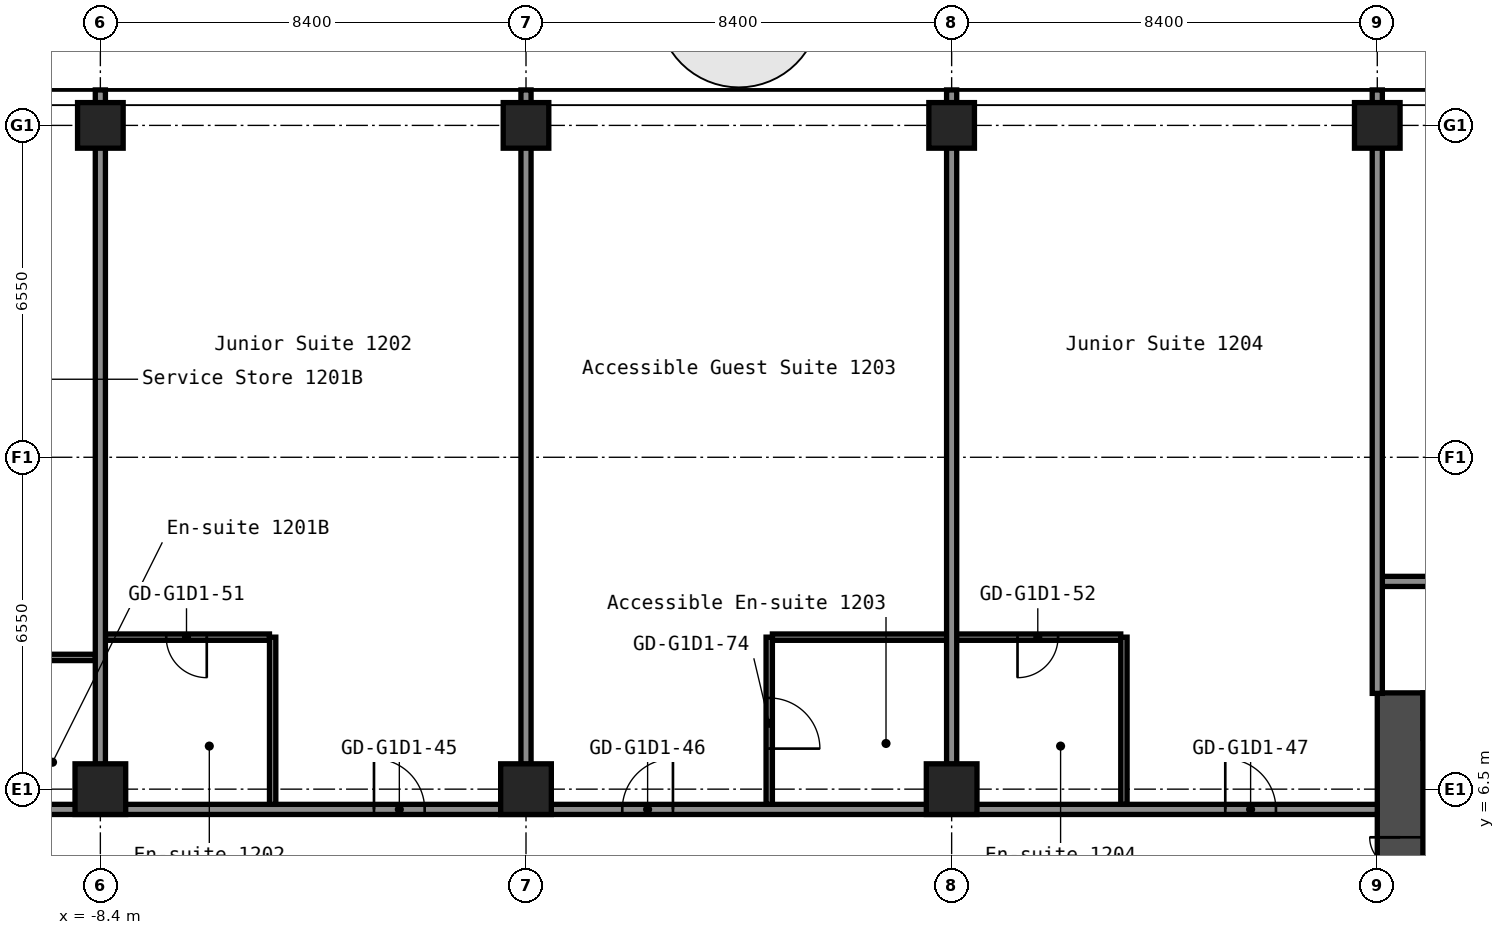
"""IFC4 building model, lengths in metres.
Left out: names, types, materials, properties, quantities, classifications, styles, units other than length and angle.
Written with IfcOpenShell. Run it as: python <this file> out.ifc"""

import sys

from ifc_helpers import new_model, si_unit, direction, frame, frame_2d, origin, origin_2d, place, context, subcontext, project, spatial, rectangle, hollow_rectangle, extrude, element, fill, save


model = new_model("IFC4")
c1 = context("Model", 3, precision=1e-05, world=origin(), true_north=direction((0.0, 1.0)))
c2 = subcontext(c1, "Body", "Model", "MODEL_VIEW")
j1 = project(units=[si_unit("LENGTHUNIT", "METRE"), si_unit("PLANEANGLEUNIT", "RADIAN")], contexts=[c1])
p1 = place(None, origin())
s1 = spatial("IfcSite", under=j1, at=p1, CompositionType="ELEMENT")
p2 = place(p1, origin())
s2 = spatial("IfcBuilding", under=s1, at=p2, CompositionType="ELEMENT")
p3 = place(p2, frame((0.0, 0.0, 45.4)))
s3 = spatial("IfcBuildingStorey", under=s2, at=p3, CompositionType="ELEMENT", Elevation=45.4)
p4 = place(p3, frame((-8.4, 6.5, 0.0), z_axis=(0.0, 0.0, 1.0), x_axis=(1.0, 0.0, 0.0)))
e1 = element("IfcColumn", 1, at=p4, inside=s3, PredefinedType="COLUMN", context=c2, shape_type="SweptSolid", body=[
    extrude(hollow_rectangle(XDim=1.0, YDim=1.0, WallThickness=0.04, at=origin_2d()), origin(), (0.0, 0.0, 1.0), 2.8),
])
p5 = place(p3, frame((-8.4, 19.6, 0.0), z_axis=(0.0, 0.0, 1.0), x_axis=(1.0, 0.0, 0.0)))
e2 = element("IfcColumn", 2, at=p5, inside=s3, PredefinedType="COLUMN", context=c2, shape_type="SweptSolid", body=[
    extrude(hollow_rectangle(XDim=0.9, YDim=0.9, WallThickness=0.036, at=origin_2d()), origin(), (0.0, 0.0, 1.0), 2.8),
])
p6 = place(p3, frame((0.0, 6.5, 0.0), z_axis=(0.0, 0.0, 1.0), x_axis=(1.0, 0.0, 0.0)))
e3 = element("IfcColumn", 3, at=p6, inside=s3, PredefinedType="COLUMN", context=c2, shape_type="SweptSolid", body=[
    extrude(hollow_rectangle(XDim=1.0, YDim=1.0, WallThickness=0.04, at=origin_2d()), origin(), (0.0, 0.0, 1.0), 2.8),
])
p7 = place(p3, frame((0.0, 19.6, 0.0), z_axis=(0.0, 0.0, 1.0), x_axis=(1.0, 0.0, 0.0)))
e4 = element("IfcColumn", 4, at=p7, inside=s3, PredefinedType="COLUMN", context=c2, shape_type="SweptSolid", body=[
    extrude(hollow_rectangle(XDim=0.9, YDim=0.9, WallThickness=0.036, at=origin_2d()), origin(), (0.0, 0.0, 1.0), 2.8),
])
p8 = place(p3, frame((8.4, 6.5, 0.0), z_axis=(0.0, 0.0, 1.0), x_axis=(1.0, 0.0, 0.0)))
e5 = element("IfcColumn", 5, at=p8, inside=s3, PredefinedType="COLUMN", context=c2, shape_type="SweptSolid", body=[
    extrude(hollow_rectangle(XDim=1.0, YDim=1.0, WallThickness=0.04, at=origin_2d()), origin(), (0.0, 0.0, 1.0), 2.8),
])
for number, where, z_axis, x_axis in (
    (6, (8.4, 19.6, 0.0), (0.0, 0.0, 1.0), (1.0, 0.0, 0.0)),
    (7, (16.8, 19.6, 0.0), (0.0, 0.0, 1.0), (1.0, 0.0, 0.0)),
):
    element("IfcColumn", number, at=place(p3, frame(where, z_axis=z_axis, x_axis=x_axis)), inside=s3, PredefinedType="COLUMN", context=c2, shape_type="SweptSolid", body=[
        extrude(hollow_rectangle(XDim=0.9, YDim=0.9, WallThickness=0.036, at=origin_2d()), origin(), (0.0, 0.0, 1.0), 2.8),
    ])
p9 = place(p3, frame((17.25, -8.4, 0.0), z_axis=(0.0, 0.0, 1.0), x_axis=(0.0, 1.0, 0.0)))
e8 = element("IfcWall", 8, at=p9, inside=s3, PredefinedType="SHEAR", context=c2, shape_type="SweptSolid", body=[
    extrude(rectangle(XDim=16.8, YDim=0.9, at=frame_2d((8.4, 0.0))), origin(), (0.0, 0.0, 1.0), 2.8),
])
p10 = place(p9, frame((12.75, 0.0, 0.0)))
e9 = element("IfcOpeningElement", 9, at=p10, cuts=e8, PredefinedType="OPENING", context=c2, shape_type="SweptSolid", body=[
    extrude(rectangle(XDim=1.2, YDim=2.1, at=frame_2d((0.6, 1.05))), frame((0.0, 0.46, 0.0), z_axis=(0.0, -1.0, 0.0), x_axis=(1.0, 0.0, 0.0)), (0.0, 0.0, 1.0), 0.92),
])
p11 = place(p9, frame((2.85, 0.0, 0.0)))
e10 = element("IfcOpeningElement", 10, at=p11, cuts=e8, PredefinedType="OPENING", context=c2, shape_type="SweptSolid", body=[
    extrude(rectangle(XDim=1.2, YDim=2.1, at=frame_2d((0.6, 1.05))), frame((0.0, 0.46, 0.0), z_axis=(0.0, -1.0, 0.0), x_axis=(1.0, 0.0, 0.0)), (0.0, 0.0, 1.0), 0.92),
])
p12 = place(p3, frame((17.7, 7.95, 0.0), z_axis=(0.0, 0.0, 1.0), x_axis=(1.0, 0.0, 0.0)))
e11 = element("IfcWall", 11, at=p12, inside=s3, PredefinedType="SHEAR", context=c2, shape_type="SweptSolid", body=[
    extrude(rectangle(XDim=15.0, YDim=0.9, at=frame_2d((7.5, 0.0))), origin(), (0.0, 0.0, 1.0), 2.8),
])
p13 = place(p12, frame((10.4, 0.0, 0.0)))
e12 = element("IfcOpeningElement", 12, at=p13, cuts=e11, PredefinedType="OPENING", context=c2, shape_type="SweptSolid", body=[
    extrude(rectangle(XDim=1.2, YDim=2.1, at=frame_2d((0.6, 1.05))), frame((0.0, 0.46, 0.0), z_axis=(0.0, -1.0, 0.0), x_axis=(1.0, 0.0, 0.0)), (0.0, 0.0, 1.0), 0.92),
])
p14 = place(p12, frame((13.35, 0.0, 0.0)))
e13 = element("IfcOpeningElement", 13, at=p14, cuts=e11, PredefinedType="OPENING", context=c2, shape_type="SweptSolid", body=[
    extrude(rectangle(XDim=0.9, YDim=2.1, at=frame_2d((0.45, 1.05))), frame((0.0, 0.46, 0.0), z_axis=(0.0, -1.0, 0.0), x_axis=(1.0, 0.0, 0.0)), (0.0, 0.0, 1.0), 0.92),
])
p15 = place(p3, frame((-16.8, 6.1, 0.0), z_axis=(0.0, 0.0, 1.0), x_axis=(1.0, 0.0, 0.0)))
e14 = element("IfcWall", 14, at=p15, inside=s3, PredefinedType="PARTITIONING", context=c2, shape_type="SweptSolid", body=[
    extrude(rectangle(XDim=33.6, YDim=0.2, at=frame_2d((16.8, 0.0))), origin(), (0.0, 0.0, 1.0), 2.8),
])
p16 = place(p15, frame((2.85, 0.0, 0.0)))
e15 = element("IfcOpeningElement", 15, at=p16, cuts=e14, PredefinedType="OPENING", context=c2, shape_type="SweptSolid", body=[
    extrude(rectangle(XDim=1.0, YDim=2.1, at=frame_2d((0.5, 1.05))), frame((0.0, 0.11, 0.0), z_axis=(0.0, -1.0, 0.0), x_axis=(1.0, 0.0, 0.0)), (0.0, 0.0, 1.0), 0.22),
])
p17 = place(p15, frame((4.55, 0.0, 0.0)))
e16 = element("IfcOpeningElement", 16, at=p17, cuts=e14, PredefinedType="OPENING", context=c2, shape_type="SweptSolid", body=[
    extrude(rectangle(XDim=1.0, YDim=2.1, at=frame_2d((0.5, 1.05))), frame((0.0, 0.11, 0.0), z_axis=(0.0, -1.0, 0.0), x_axis=(1.0, 0.0, 0.0)), (0.0, 0.0, 1.0), 0.22),
])
p18 = place(p15, frame((13.8, 0.0, 0.0)))
e17 = element("IfcOpeningElement", 17, at=p18, cuts=e14, PredefinedType="OPENING", context=c2, shape_type="SweptSolid", body=[
    extrude(rectangle(XDim=1.0, YDim=2.1, at=frame_2d((0.5, 1.05))), frame((0.0, 0.11, 0.0), z_axis=(0.0, -1.0, 0.0), x_axis=(1.0, 0.0, 0.0)), (0.0, 0.0, 1.0), 0.22),
])
p19 = place(p15, frame((18.7, 0.0, 0.0)))
e18 = element("IfcOpeningElement", 18, at=p19, cuts=e14, PredefinedType="OPENING", context=c2, shape_type="SweptSolid", body=[
    extrude(rectangle(XDim=1.0, YDim=2.1, at=frame_2d((0.5, 1.05))), frame((0.0, 0.11, 0.0), z_axis=(0.0, -1.0, 0.0), x_axis=(1.0, 0.0, 0.0)), (0.0, 0.0, 1.0), 0.22),
])
p20 = place(p15, frame((30.6, 0.0, 0.0)))
e19 = element("IfcOpeningElement", 19, at=p20, cuts=e14, PredefinedType="OPENING", context=c2, shape_type="SweptSolid", body=[
    extrude(rectangle(XDim=1.0, YDim=2.1, at=frame_2d((0.5, 1.05))), frame((0.0, 0.11, 0.0), z_axis=(0.0, -1.0, 0.0), x_axis=(1.0, 0.0, 0.0)), (0.0, 0.0, 1.0), 0.22),
])
p21 = place(p3, frame((-10.837, 9.1, 0.0), z_axis=(0.0, 0.0, 1.0), x_axis=(1.0, 0.0, 0.0)))
e20 = element("IfcWall", 20, at=p21, inside=s3, PredefinedType="PARTITIONING", context=c2, shape_type="SweptSolid", body=[
    extrude(rectangle(XDim=2.337, YDim=0.125, at=frame_2d((1.169, 0.0))), origin(), (0.0, 0.0, 1.0), 2.8),
])
p22 = place(p3, frame((-8.3, 9.5, 0.0), z_axis=(0.0, 0.0, 1.0), x_axis=(1.0, 0.0, 0.0)))
e21 = element("IfcWall", 21, at=p22, inside=s3, PredefinedType="PARTITIONING", context=c2, shape_type="SweptSolid", body=[
    extrude(rectangle(XDim=3.238, YDim=0.125, at=frame_2d((1.619, 0.0))), origin(), (0.0, 0.0, 1.0), 2.8),
])
p23 = place(p22, frame((1.2, 0.0, 0.0)))
e22 = element("IfcOpeningElement", 22, at=p23, cuts=e21, PredefinedType="OPENING", context=c2, shape_type="SweptSolid", body=[
    extrude(rectangle(XDim=0.8, YDim=2.1, at=frame_2d((0.4, 1.05))), frame((0.0, 0.073, 0.0), z_axis=(0.0, -1.0, 0.0), x_axis=(1.0, 0.0, 0.0)), (0.0, 0.0, 1.0), 0.145),
])
p24 = place(p3, frame((4.863, 9.5, 0.0), z_axis=(0.0, 0.0, 1.0), x_axis=(1.0, 0.0, 0.0)))
e23 = element("IfcWall", 23, at=p24, inside=s3, PredefinedType="PARTITIONING", context=c2, shape_type="SweptSolid", body=[
    extrude(rectangle(XDim=6.875, YDim=0.125, at=frame_2d((3.438, 0.0))), origin(), (0.0, 0.0, 1.0), 2.8),
])
p25 = place(p24, frame((4.837, 0.0, 0.0)))
e24 = element("IfcOpeningElement", 24, at=p25, cuts=e23, PredefinedType="OPENING", context=c2, shape_type="SweptSolid", body=[
    extrude(rectangle(XDim=0.8, YDim=2.1, at=frame_2d((0.4, 1.05))), frame((0.0, 0.073, 0.0), z_axis=(0.0, -1.0, 0.0), x_axis=(1.0, 0.0, 0.0)), (0.0, 0.0, 1.0), 0.145),
])
p26 = place(p3, frame((16.8, 10.6, 0.0), z_axis=(0.0, 0.0, 1.0), x_axis=(1.0, 0.0, 0.0)))
e25 = element("IfcWall", 25, at=p26, inside=s3, PredefinedType="PARTITIONING", context=c2, shape_type="SweptSolid", body=[
    extrude(rectangle(XDim=34.3, YDim=0.2, at=frame_2d((17.15, 0.0))), origin(), (0.0, 0.0, 1.0), 2.8),
])
p27 = place(p26, frame((3.4, 0.0, 0.0)))
e26 = element("IfcOpeningElement", 26, at=p27, cuts=e25, PredefinedType="OPENING", context=c2, shape_type="SweptSolid", body=[
    extrude(rectangle(XDim=1.6, YDim=2.1, at=frame_2d((0.8, 1.05))), frame((0.0, 0.11, 0.0), z_axis=(0.0, -1.0, 0.0), x_axis=(1.0, 0.0, 0.0)), (0.0, 0.0, 1.0), 0.22),
])
p28 = place(p26, frame((11.8, 0.0, 0.0)))
e27 = element("IfcOpeningElement", 27, at=p28, cuts=e25, PredefinedType="OPENING", context=c2, shape_type="SweptSolid", body=[
    extrude(rectangle(XDim=1.6, YDim=2.1, at=frame_2d((0.8, 1.05))), frame((0.0, 0.11, 0.0), z_axis=(0.0, -1.0, 0.0), x_axis=(1.0, 0.0, 0.0)), (0.0, 0.0, 1.0), 0.22),
])
p29 = place(p26, frame((20.2, 0.0, 0.0)))
e28 = element("IfcOpeningElement", 28, at=p29, cuts=e25, PredefinedType="OPENING", context=c2, shape_type="SweptSolid", body=[
    extrude(rectangle(XDim=1.6, YDim=2.1, at=frame_2d((0.8, 1.05))), frame((0.0, 0.11, 0.0), z_axis=(0.0, -1.0, 0.0), x_axis=(1.0, 0.0, 0.0)), (0.0, 0.0, 1.0), 0.22),
])
p30 = place(p26, frame((28.8, 0.0, 0.0)))
e29 = element("IfcOpeningElement", 29, at=p30, cuts=e25, PredefinedType="OPENING", context=c2, shape_type="SweptSolid", body=[
    extrude(rectangle(XDim=1.6, YDim=2.1, at=frame_2d((0.8, 1.05))), frame((0.0, 0.11, 0.0), z_axis=(0.0, -1.0, 0.0), x_axis=(1.0, 0.0, 0.0)), (0.0, 0.0, 1.0), 0.22),
])
p31 = place(p3, frame((-8.4, 6.99, 0.0), z_axis=(0.0, 0.0, 1.0), x_axis=(0.0, 1.0, 0.0)))
e30 = element("IfcWall", 30, at=p31, inside=s3, PredefinedType="PARTITIONING", context=c2, shape_type="SweptSolid", body=[
    extrude(rectangle(XDim=13.31, YDim=0.2, at=frame_2d((6.655, 0.0))), origin(), (0.0, 0.0, 1.0), 2.8),
])
p32 = place(p3, frame((-5.0, 6.2, 0.0), z_axis=(0.0, 0.0, 1.0), x_axis=(0.0, 1.0, 0.0)))
e31 = element("IfcWall", 31, at=p32, inside=s3, PredefinedType="PARTITIONING", context=c2, shape_type="SweptSolid", body=[
    extrude(rectangle(XDim=3.3, YDim=0.125, at=frame_2d((1.65, 0.0))), origin(), (0.0, 0.0, 1.0), 2.8),
])
p33 = place(p3, frame((0.0, 6.99, 0.0), z_axis=(0.0, 0.0, 1.0), x_axis=(0.0, 1.0, 0.0)))
e32 = element("IfcWall", 32, at=p33, inside=s3, PredefinedType="PARTITIONING", context=c2, shape_type="SweptSolid", body=[
    extrude(rectangle(XDim=13.31, YDim=0.2, at=frame_2d((6.655, 0.0))), origin(), (0.0, 0.0, 1.0), 2.8),
])
p34 = place(p3, frame((4.8, 6.2, 0.0), z_axis=(0.0, 0.0, 1.0), x_axis=(0.0, 1.0, 0.0)))
e33 = element("IfcWall", 33, at=p34, inside=s3, PredefinedType="PARTITIONING", context=c2, shape_type="SweptSolid", body=[
    extrude(rectangle(XDim=3.3, YDim=0.125, at=frame_2d((1.65, 0.0))), origin(), (0.0, 0.0, 1.0), 2.8),
])
p35 = place(p34, frame((1.1, 0.0, 0.0)))
e34 = element("IfcOpeningElement", 34, at=p35, cuts=e33, PredefinedType="OPENING", context=c2, shape_type="SweptSolid", body=[
    extrude(rectangle(XDim=1.0, YDim=2.1, at=frame_2d((0.5, 1.05))), frame((0.0, 0.073, 0.0), z_axis=(0.0, -1.0, 0.0), x_axis=(1.0, 0.0, 0.0)), (0.0, 0.0, 1.0), 0.145),
])
p36 = place(p3, frame((8.4, 6.99, 0.0), z_axis=(0.0, 0.0, 1.0), x_axis=(0.0, 1.0, 0.0)))
e35 = element("IfcWall", 35, at=p36, inside=s3, PredefinedType="PARTITIONING", context=c2, shape_type="SweptSolid", body=[
    extrude(rectangle(XDim=13.31, YDim=0.2, at=frame_2d((6.655, 0.0))), origin(), (0.0, 0.0, 1.0), 2.8),
])
p37 = place(p3, frame((11.8, 6.2, 0.0), z_axis=(0.0, 0.0, 1.0), x_axis=(0.0, 1.0, 0.0)))
e36 = element("IfcWall", 36, at=p37, inside=s3, PredefinedType="PARTITIONING", context=c2, shape_type="SweptSolid", body=[
    extrude(rectangle(XDim=3.3, YDim=0.125, at=frame_2d((1.65, 0.0))), origin(), (0.0, 0.0, 1.0), 2.8),
])
p38 = place(p3, frame((16.8, 8.39, 0.0), z_axis=(0.0, 0.0, 1.0), x_axis=(0.0, 1.0, 0.0)))
e37 = element("IfcWall", 37, at=p38, inside=s3, PredefinedType="PARTITIONING", context=c2, shape_type="SweptSolid", body=[
    extrude(rectangle(XDim=11.91, YDim=0.2, at=frame_2d((5.955, 0.0))), origin(), (0.0, 0.0, 1.0), 2.8),
])
p39 = place(p10, origin())
e38 = element("IfcDoor", 38, at=p39, inside=s3, OperationType="DOUBLE_DOOR_SINGLE_SWING", PredefinedType="DOOR", context=c2, shape_type="SweptSolid", body=[
    extrude(rectangle(XDim=1.2, YDim=2.1, at=frame_2d((0.6, 1.05))), frame((0.0, 0.025, 0.0), z_axis=(0.0, -1.0, 0.0), x_axis=(1.0, 0.0, 0.0)), (0.0, 0.0, 1.0), 0.05),
])
fill(e9, e38)
p40 = place(p18, origin())
e39 = element("IfcDoor", 39, at=p40, inside=s3, OperationType="SINGLE_SWING_RIGHT", PredefinedType="DOOR", context=c2, shape_type="SweptSolid", body=[
    extrude(rectangle(XDim=1.0, YDim=2.1, at=frame_2d((0.5, 1.05))), frame((0.0, 0.025, 0.0), z_axis=(0.0, -1.0, 0.0), x_axis=(1.0, 0.0, 0.0)), (0.0, 0.0, 1.0), 0.05),
])
fill(e17, e39)
p41 = place(p19, origin())
e40 = element("IfcDoor", 40, at=p41, inside=s3, OperationType="SINGLE_SWING_LEFT", PredefinedType="DOOR", context=c2, shape_type="SweptSolid", body=[
    extrude(rectangle(XDim=1.0, YDim=2.1, at=frame_2d((0.5, 1.05))), frame((0.0, 0.025, 0.0), z_axis=(0.0, -1.0, 0.0), x_axis=(1.0, 0.0, 0.0)), (0.0, 0.0, 1.0), 0.05),
])
fill(e18, e40)
p42 = place(p20, origin())
e41 = element("IfcDoor", 41, at=p42, inside=s3, OperationType="SINGLE_SWING_RIGHT", PredefinedType="DOOR", context=c2, shape_type="SweptSolid", body=[
    extrude(rectangle(XDim=1.0, YDim=2.1, at=frame_2d((0.5, 1.05))), frame((0.0, 0.025, 0.0), z_axis=(0.0, -1.0, 0.0), x_axis=(1.0, 0.0, 0.0)), (0.0, 0.0, 1.0), 0.05),
])
fill(e19, e41)
p43 = place(p23, origin())
e42 = element("IfcDoor", 42, at=p43, inside=s3, OperationType="SINGLE_SWING_RIGHT", PredefinedType="DOOR", context=c2, shape_type="SweptSolid", body=[
    extrude(rectangle(XDim=0.8, YDim=2.1, at=frame_2d((0.4, 1.05))), frame((0.0, 0.025, 0.0), z_axis=(0.0, -1.0, 0.0), x_axis=(1.0, 0.0, 0.0)), (0.0, 0.0, 1.0), 0.05),
])
fill(e22, e42)
p44 = place(p25, origin())
e43 = element("IfcDoor", 43, at=p44, inside=s3, OperationType="SINGLE_SWING_LEFT", PredefinedType="DOOR", context=c2, shape_type="SweptSolid", body=[
    extrude(rectangle(XDim=0.8, YDim=2.1, at=frame_2d((0.4, 1.05))), frame((0.0, 0.025, 0.0), z_axis=(0.0, -1.0, 0.0), x_axis=(1.0, 0.0, 0.0)), (0.0, 0.0, 1.0), 0.05),
])
fill(e24, e43)
p45 = place(p35, origin())
e44 = element("IfcDoor", 44, at=p45, inside=s3, OperationType="SINGLE_SWING_LEFT", PredefinedType="DOOR", context=c2, shape_type="SweptSolid", body=[
    extrude(rectangle(XDim=1.0, YDim=2.1, at=frame_2d((0.5, 1.05))), frame((0.0, 0.025, 0.0), z_axis=(0.0, -1.0, 0.0), x_axis=(1.0, 0.0, 0.0)), (0.0, 0.0, 1.0), 0.05),
])
fill(e34, e44)
save(model, sys.argv[1])
